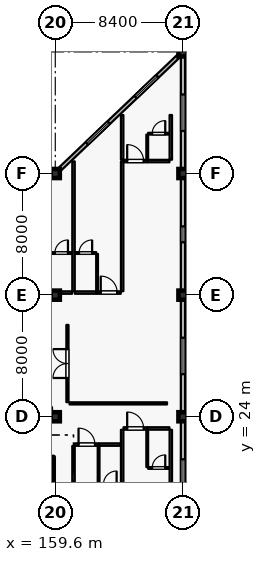
"""IFC4 building model, lengths in metres.
Left out: names, types, materials, properties, quantities, classifications, styles, units other than length and angle.
Written with IfcOpenShell. Run it as: python <this file> out.ifc"""

import sys

from ifc_helpers import new_model, si_unit, direction, frame, frame_2d, origin, origin_2d, place, context, subcontext, project, spatial, rectangle, extrude, element, fill, save


model = new_model("IFC4")
c1 = context("Model", 3, precision=1e-05, world=origin(), true_north=direction((0.0, 1.0)))
c2 = subcontext(c1, "Body", "Model", "MODEL_VIEW")
j1 = project(units=[si_unit("LENGTHUNIT", "METRE"), si_unit("PLANEANGLEUNIT", "RADIAN")], contexts=[c1])
p1 = place(None, origin())
s1 = spatial("IfcSite", under=j1, at=p1, CompositionType="ELEMENT")
p2 = place(p1, origin())
s2 = spatial("IfcBuilding", under=s1, at=p2, CompositionType="ELEMENT")
p3 = place(p2, frame((0.0, 0.0, 39.6)))
s3 = spatial("IfcBuildingStorey", under=s2, at=p3, CompositionType="ELEMENT", Elevation=39.6)
for number, where, z_axis, x_axis in (
    (1, (159.6, 24.0, 0.0), (0.0, 0.0, 1.0), (1.0, 0.0, 0.0)),
    (2, (159.6, 40.0, 0.0), (0.0, 0.0, 1.0), (1.0, 0.0, 0.0)),
    (3, (168.0, 32.0, 0.0), (0.0, 0.0, 1.0), (1.0, 0.0, 0.0)),
    (4, (168.0, 48.0, 0.0), (0.0, 0.0, 1.0), (1.0, 0.0, 0.0)),
    (5, (159.6, 32.0, 0.0), (0.0, 0.0, 1.0), (1.0, 0.0, 0.0)),
    (6, (168.0, 24.0, 0.0), (0.0, 0.0, 1.0), (1.0, 0.0, 0.0)),
    (7, (168.0, 40.0, 0.0), (0.0, 0.0, 1.0), (1.0, 0.0, 0.0)),
):
    element("IfcColumn", number, at=place(p3, frame(where, z_axis=z_axis, x_axis=x_axis)), inside=s3, PredefinedType="COLUMN", context=c2, shape_type="SweptSolid", body=[
        extrude(rectangle(XDim=0.6, YDim=0.6, at=origin_2d()), origin(), (0.0, 0.0, 1.0), 3.6),
    ])
p4 = place(p3, frame((159.9, 40.286, 0.0), z_axis=(0.0, 0.0, 1.0), x_axis=(0.724156257633, 0.689635928973, 0.0)))
e8 = element("IfcWall", 8, at=p4, inside=s3, PredefinedType="SOLIDWALL", context=c2, shape_type="SweptSolid", body=[
    extrude(rectangle(XDim=10.771, YDim=0.24, at=frame_2d((5.386, 0.0))), origin(), (0.0, 0.0, 1.0), 2.94),
])
p5 = place(p4, frame((2.452, 0.0, 0.8)))
e9 = element("IfcOpeningElement", 9, at=p5, cuts=e8, PredefinedType="OPENING", context=c2, shape_type="SweptSolid", body=[
    extrude(rectangle(XDim=2.0, YDim=1.75, at=frame_2d((1.0, 0.875))), frame((0.0, 0.13, 0.0), z_axis=(0.0, -1.0, 0.0), x_axis=(1.0, 0.0, 0.0)), (0.0, 0.0, 1.0), 0.26),
])
p6 = place(p4, frame((6.871, 0.0, 0.8)))
e10 = element("IfcOpeningElement", 10, at=p6, cuts=e8, PredefinedType="OPENING", context=c2, shape_type="SweptSolid", body=[
    extrude(rectangle(XDim=2.0, YDim=1.75, at=frame_2d((1.0, 0.875))), frame((0.0, 0.13, 0.0), z_axis=(0.0, -1.0, 0.0), x_axis=(1.0, 0.0, 0.0)), (0.0, 0.0, 1.0), 0.26),
])
p7 = place(p3, frame((168.0, 47.7, 0.0), z_axis=(0.0, 0.0, 1.0), x_axis=(0.0, -1.0, 0.0)))
e11 = element("IfcWall", 11, at=p7, inside=s3, PredefinedType="SOLIDWALL", context=c2, shape_type="SweptSolid", body=[
    extrude(rectangle(XDim=7.4, YDim=0.28, at=frame_2d((3.7, 0.0))), origin(), (0.0, 0.0, 1.0), 2.7),
])
p8 = place(p7, frame((2.5, 0.0, 0.5)))
e12 = element("IfcOpeningElement", 12, at=p8, cuts=e11, PredefinedType="OPENING", context=c2, shape_type="SweptSolid", body=[
    extrude(rectangle(XDim=2.4, YDim=1.65, at=frame_2d((1.2, 0.825))), frame((0.0, 0.15, 0.0), z_axis=(0.0, -1.0, 0.0), x_axis=(1.0, 0.0, 0.0)), (0.0, 0.0, 1.0), 0.3),
])
p9 = place(p3, frame((168.0, 39.7, 0.0), z_axis=(0.0, 0.0, 1.0), x_axis=(0.0, -1.0, 0.0)))
e13 = element("IfcWall", 13, at=p9, inside=s3, PredefinedType="SOLIDWALL", context=c2, shape_type="SweptSolid", body=[
    extrude(rectangle(XDim=7.4, YDim=0.28, at=frame_2d((3.7, 0.0))), origin(), (0.0, 0.0, 1.0), 2.7),
])
p10 = place(p9, frame((3.175, 0.0, 0.5)))
e14 = element("IfcOpeningElement", 14, at=p10, cuts=e13, PredefinedType="OPENING", context=c2, shape_type="SweptSolid", body=[
    extrude(rectangle(XDim=1.05, YDim=1.65, at=frame_2d((0.525, 0.825))), frame((0.0, 0.15, 0.0), z_axis=(0.0, -1.0, 0.0), x_axis=(1.0, 0.0, 0.0)), (0.0, 0.0, 1.0), 0.3),
])
p11 = place(p3, frame((168.0, 31.7, 0.0), z_axis=(0.0, 0.0, 1.0), x_axis=(0.0, -1.0, 0.0)))
e15 = element("IfcWall", 15, at=p11, inside=s3, PredefinedType="SOLIDWALL", context=c2, shape_type="SweptSolid", body=[
    extrude(rectangle(XDim=7.4, YDim=0.28, at=frame_2d((3.7, 0.0))), origin(), (0.0, 0.0, 1.0), 2.7),
])
p12 = place(p11, frame((2.5, 0.0, 0.5)))
e16 = element("IfcOpeningElement", 16, at=p12, cuts=e15, PredefinedType="OPENING", context=c2, shape_type="SweptSolid", body=[
    extrude(rectangle(XDim=2.4, YDim=1.65, at=frame_2d((1.2, 0.825))), frame((0.0, 0.15, 0.0), z_axis=(0.0, -1.0, 0.0), x_axis=(1.0, 0.0, 0.0)), (0.0, 0.0, 1.0), 0.3),
])
p13 = place(p3, frame((168.0, 23.7, 0.0), z_axis=(0.0, 0.0, 1.0), x_axis=(0.0, -1.0, 0.0)))
e17 = element("IfcWall", 17, at=p13, inside=s3, PredefinedType="SOLIDWALL", context=c2, shape_type="SweptSolid", body=[
    extrude(rectangle(XDim=7.4, YDim=0.28, at=frame_2d((3.7, 0.0))), origin(), (0.0, 0.0, 1.0), 2.7),
])
p14 = place(p13, frame((2.5, 0.0, 0.5)))
e18 = element("IfcOpeningElement", 18, at=p14, cuts=e17, PredefinedType="OPENING", context=c2, shape_type="SweptSolid", body=[
    extrude(rectangle(XDim=2.4, YDim=1.65, at=frame_2d((1.2, 0.825))), frame((0.0, 0.15, 0.0), z_axis=(0.0, -1.0, 0.0), x_axis=(1.0, 0.0, 0.0)), (0.0, 0.0, 1.0), 0.3),
])
p15 = place(p3, frame((159.3, 17.005, 0.0), z_axis=(0.0, 0.0, 1.0), x_axis=(0.0, 1.0, 0.0)))
e19 = element("IfcWall", 19, at=p15, inside=s3, PredefinedType="SHEAR", context=c2, shape_type="SweptSolid", body=[
    extrude(rectangle(XDim=3.95, YDim=0.4, at=frame_2d((1.975, 0.0))), origin(), (0.0, 0.0, 1.0), 3.335),
])
p16 = place(p3, frame((151.3, 21.16, 0.0), z_axis=(0.0, 0.0, 1.0), x_axis=(1.0, 0.0, 0.0)))
e20 = element("IfcWall", 20, at=p16, inside=s3, PredefinedType="SHEAR", context=c2, shape_type="SweptSolid", body=[
    extrude(rectangle(XDim=8.2, YDim=0.4, at=frame_2d((4.1, 0.0))), origin(), (0.0, 0.0, 1.0), 3.335),
])
p17 = place(p16, frame((0.43, 0.0, 0.0)))
e21 = element("IfcOpeningElement", 21, at=p17, cuts=e20, PredefinedType="OPENING", context=c2, shape_type="SweptSolid", body=[
    extrude(rectangle(XDim=1.16, YDim=2.2, at=frame_2d((0.58, 1.1))), frame((0.0, 0.21, 0.0), z_axis=(0.0, -1.0, 0.0), x_axis=(1.0, 0.0, 0.0)), (0.0, 0.0, 1.0), 0.42),
])
p18 = place(p3, frame((159.26, 32.17, 0.0), z_axis=(0.0, 0.0, 1.0), x_axis=(1.0, 0.0, 0.0)))
e22 = element("IfcWall", 22, at=p18, inside=s3, PredefinedType="PARTITIONING", context=c2, shape_type="SweptSolid", body=[
    extrude(rectangle(XDim=1.45, YDim=0.16, at=frame_2d((0.725, 0.0))), origin(), (0.0, 0.0, 1.0), 3.335),
])
p19 = place(p3, frame((159.31, 34.77, 0.0), z_axis=(0.0, 0.0, 1.0), x_axis=(1.0, 0.0, 0.0)))
e23 = element("IfcWall", 23, at=p19, inside=s3, PredefinedType="PARTITIONING", context=c2, shape_type="SweptSolid", body=[
    extrude(rectangle(XDim=1.39, YDim=0.115, at=frame_2d((0.695, 0.0))), origin(), (0.0, 0.0, 1.0), 3.335),
])
p20 = place(p19, frame((0.265, 0.0, 0.0)))
e24 = element("IfcOpeningElement", 24, at=p20, cuts=e23, PredefinedType="OPENING", context=c2, shape_type="SweptSolid", body=[
    extrude(rectangle(XDim=0.86, YDim=2.12, at=frame_2d((0.43, 1.06))), frame((0.0, 0.067, 0.0), z_axis=(0.0, -1.0, 0.0), x_axis=(1.0, 0.0, 0.0)), (0.0, 0.0, 1.0), 0.135),
])
p21 = place(p3, frame((160.89, 32.17, 0.0), z_axis=(0.0, 0.0, 1.0), x_axis=(1.0, 0.0, 0.0)))
e25 = element("IfcWall", 25, at=p21, inside=s3, PredefinedType="PARTITIONING", context=c2, shape_type="SweptSolid", body=[
    extrude(rectangle(XDim=1.45, YDim=0.16, at=frame_2d((0.725, 0.0))), origin(), (0.0, 0.0, 1.0), 3.335),
])
p22 = place(p3, frame((162.35, 32.17, 0.0), z_axis=(0.0, 0.0, 1.0), x_axis=(1.0, 0.0, 0.0)))
e26 = element("IfcWall", 26, at=p22, inside=s3, PredefinedType="PARTITIONING", context=c2, shape_type="SweptSolid", body=[
    extrude(rectangle(XDim=1.56, YDim=0.16, at=frame_2d((0.78, 0.0))), origin(), (0.0, 0.0, 1.0), 3.335),
])
p23 = place(p22, frame((0.24, 0.0, 0.0)))
e27 = element("IfcOpeningElement", 27, at=p23, cuts=e26, PredefinedType="OPENING", context=c2, shape_type="SweptSolid", body=[
    extrude(rectangle(XDim=1.08, YDim=2.3, at=frame_2d((0.54, 1.15))), frame((0.0, 0.09, 0.0), z_axis=(0.0, -1.0, 0.0), x_axis=(1.0, 0.0, 0.0)), (0.0, 0.0, 1.0), 0.18),
])
p24 = place(p3, frame((162.35, 32.26, 0.0), z_axis=(0.0, 0.0, 1.0), x_axis=(0.0, 1.0, 0.0)))
e28 = element("IfcWall", 28, at=p24, inside=s3, PredefinedType="PARTITIONING", context=c2, shape_type="SweptSolid", body=[
    extrude(rectangle(XDim=2.45, YDim=0.115, at=frame_2d((1.225, 0.0))), origin(), (0.0, 0.0, 1.0), 3.335),
])
p25 = place(p3, frame((160.9, 34.77, 0.0), z_axis=(0.0, 0.0, 1.0), x_axis=(1.0, 0.0, 0.0)))
e29 = element("IfcWall", 29, at=p25, inside=s3, PredefinedType="PARTITIONING", context=c2, shape_type="SweptSolid", body=[
    extrude(rectangle(XDim=1.39, YDim=0.115, at=frame_2d((0.695, 0.0))), origin(), (0.0, 0.0, 1.0), 3.335),
])
p26 = place(p25, frame((0.265, 0.0, 0.0)))
e30 = element("IfcOpeningElement", 30, at=p26, cuts=e29, PredefinedType="OPENING", context=c2, shape_type="SweptSolid", body=[
    extrude(rectangle(XDim=0.86, YDim=2.12, at=frame_2d((0.43, 1.06))), frame((0.0, 0.067, 0.0), z_axis=(0.0, -1.0, 0.0), x_axis=(1.0, 0.0, 0.0)), (0.0, 0.0, 1.0), 0.135),
])
for number, where, z_axis, x_axis in (
    (31, (160.8, 32.26, 0.0), (0.0, 0.0, 1.0), (0.0, 1.0, 0.0)),
    (32, (164.0, 32.26, 0.0), (0.0, 0.0, 1.0), (0.0, 1.0, 0.0)),
):
    element("IfcWall", number, at=place(p3, frame(where, z_axis=z_axis, x_axis=x_axis)), inside=s3, PredefinedType="PARTITIONING", context=c2, shape_type="SweptSolid", body=[
        extrude(rectangle(XDim=8.54, YDim=0.16, at=frame_2d((4.27, 0.0))), origin(), (0.0, 0.0, 1.0), 3.335),
    ])
p27 = place(p3, frame((164.09, 40.82, 0.0), z_axis=(0.0, 0.0, 1.0), x_axis=(1.0, 0.0, 0.0)))
e33 = element("IfcWall", 33, at=p27, inside=s3, PredefinedType="PARTITIONING", context=c2, shape_type="SweptSolid", body=[
    extrude(rectangle(XDim=1.56, YDim=0.16, at=frame_2d((0.78, 0.0))), origin(), (0.0, 0.0, 1.0), 3.335),
])
p28 = place(p27, frame((0.24, 0.0, 0.0)))
e34 = element("IfcOpeningElement", 34, at=p28, cuts=e33, PredefinedType="OPENING", context=c2, shape_type="SweptSolid", body=[
    extrude(rectangle(XDim=1.08, YDim=2.3, at=frame_2d((0.54, 1.15))), frame((0.0, 0.09, 0.0), z_axis=(0.0, -1.0, 0.0), x_axis=(1.0, 0.0, 0.0)), (0.0, 0.0, 1.0), 0.18),
])
p29 = place(p3, frame((165.66, 40.82, 0.0), z_axis=(0.0, 0.0, 1.0), x_axis=(1.0, 0.0, 0.0)))
e35 = element("IfcWall", 35, at=p29, inside=s3, PredefinedType="PARTITIONING", context=c2, shape_type="SweptSolid", body=[
    extrude(rectangle(XDim=1.45, YDim=0.16, at=frame_2d((0.725, 0.0))), origin(), (0.0, 0.0, 1.0), 3.335),
])
p30 = place(p3, frame((165.65, 40.91, 0.0), z_axis=(0.0, 0.0, 1.0), x_axis=(0.0, 1.0, 0.0)))
e36 = element("IfcWall", 36, at=p30, inside=s3, PredefinedType="PARTITIONING", context=c2, shape_type="SweptSolid", body=[
    extrude(rectangle(XDim=1.65, YDim=0.115, at=frame_2d((0.825, 0.0))), origin(), (0.0, 0.0, 1.0), 3.335),
])
p31 = place(p3, frame((165.71, 42.62, 0.0), z_axis=(0.0, 0.0, 1.0), x_axis=(1.0, 0.0, 0.0)))
e37 = element("IfcWall", 37, at=p31, inside=s3, PredefinedType="PARTITIONING", context=c2, shape_type="SweptSolid", body=[
    extrude(rectangle(XDim=1.39, YDim=0.115, at=frame_2d((0.695, 0.0))), origin(), (0.0, 0.0, 1.0), 3.335),
])
p32 = place(p31, frame((0.265, 0.0, 0.0)))
e38 = element("IfcOpeningElement", 38, at=p32, cuts=e37, PredefinedType="OPENING", context=c2, shape_type="SweptSolid", body=[
    extrude(rectangle(XDim=0.86, YDim=2.12, at=frame_2d((0.43, 1.06))), frame((0.0, 0.067, 0.0), z_axis=(0.0, -1.0, 0.0), x_axis=(1.0, 0.0, 0.0)), (0.0, 0.0, 1.0), 0.135),
])
for number, where, z_axis, x_axis in (
    (39, (164.0, 40.91, 0.0), (0.0, 0.0, 1.0), (0.0, 1.0, 0.0)),
    (40, (167.2, 40.91, 0.0), (0.0, 0.0, 1.0), (0.0, 1.0, 0.0)),
):
    element("IfcWall", number, at=place(p3, frame(where, z_axis=z_axis, x_axis=x_axis)), inside=s3, PredefinedType="PARTITIONING", context=c2, shape_type="SweptSolid", body=[
        extrude(rectangle(XDim=2.94, YDim=0.16, at=frame_2d((1.47, 0.0))), origin(), (0.0, 0.0, 1.0), 3.335),
    ])
p33 = place(p3, frame((160.89, 22.17, 0.0), z_axis=(0.0, 0.0, 1.0), x_axis=(1.0, 0.0, 0.0)))
e41 = element("IfcWall", 41, at=p33, inside=s3, PredefinedType="PARTITIONING", context=c2, shape_type="SweptSolid", body=[
    extrude(rectangle(XDim=1.56, YDim=0.16, at=frame_2d((0.78, 0.0))), origin(), (0.0, 0.0, 1.0), 3.335),
])
p34 = place(p33, frame((0.24, 0.0, 0.0)))
e42 = element("IfcOpeningElement", 42, at=p34, cuts=e41, PredefinedType="OPENING", context=c2, shape_type="SweptSolid", body=[
    extrude(rectangle(XDim=1.08, YDim=2.3, at=frame_2d((0.54, 1.15))), frame((0.0, 0.09, 0.0), z_axis=(0.0, -1.0, 0.0), x_axis=(1.0, 0.0, 0.0)), (0.0, 0.0, 1.0), 0.18),
])
p35 = place(p3, frame((162.46, 22.17, 0.0), z_axis=(0.0, 0.0, 1.0), x_axis=(1.0, 0.0, 0.0)))
e43 = element("IfcWall", 43, at=p35, inside=s3, PredefinedType="PARTITIONING", context=c2, shape_type="SweptSolid", body=[
    extrude(rectangle(XDim=1.45, YDim=0.16, at=frame_2d((0.725, 0.0))), origin(), (0.0, 0.0, 1.0), 3.335),
])
p36 = place(p3, frame((162.45, 19.63, 0.0), z_axis=(0.0, 0.0, 1.0), x_axis=(0.0, 1.0, 0.0)))
e44 = element("IfcWall", 44, at=p36, inside=s3, PredefinedType="PARTITIONING", context=c2, shape_type="SweptSolid", body=[
    extrude(rectangle(XDim=2.45, YDim=0.115, at=frame_2d((1.225, 0.0))), origin(), (0.0, 0.0, 1.0), 3.335),
])
p37 = place(p3, frame((160.8, 12.53, 0.0), z_axis=(0.0, 0.0, 1.0), x_axis=(0.0, 1.0, 0.0)))
e45 = element("IfcWall", 45, at=p37, inside=s3, PredefinedType="PARTITIONING", context=c2, shape_type="SweptSolid", body=[
    extrude(rectangle(XDim=9.55, YDim=0.16, at=frame_2d((4.775, 0.0))), origin(), (0.0, 0.0, 1.0), 3.335),
])
p38 = place(p3, frame((164.09, 23.23, 0.0), z_axis=(0.0, 0.0, 1.0), x_axis=(1.0, 0.0, 0.0)))
e46 = element("IfcWall", 46, at=p38, inside=s3, PredefinedType="PARTITIONING", context=c2, shape_type="SweptSolid", body=[
    extrude(rectangle(XDim=1.56, YDim=0.16, at=frame_2d((0.78, 0.0))), origin(), (0.0, 0.0, 1.0), 3.335),
])
p39 = place(p38, frame((0.24, 0.0, 0.0)))
e47 = element("IfcOpeningElement", 47, at=p39, cuts=e46, PredefinedType="OPENING", context=c2, shape_type="SweptSolid", body=[
    extrude(rectangle(XDim=1.08, YDim=2.3, at=frame_2d((0.54, 1.15))), frame((0.0, 0.09, 0.0), z_axis=(0.0, -1.0, 0.0), x_axis=(1.0, 0.0, 0.0)), (0.0, 0.0, 1.0), 0.18),
])
p40 = place(p3, frame((165.66, 23.23, 0.0), z_axis=(0.0, 0.0, 1.0), x_axis=(1.0, 0.0, 0.0)))
e48 = element("IfcWall", 48, at=p40, inside=s3, PredefinedType="PARTITIONING", context=c2, shape_type="SweptSolid", body=[
    extrude(rectangle(XDim=1.45, YDim=0.16, at=frame_2d((0.725, 0.0))), origin(), (0.0, 0.0, 1.0), 3.335),
])
p41 = place(p3, frame((165.65, 20.69, 0.0), z_axis=(0.0, 0.0, 1.0), x_axis=(0.0, 1.0, 0.0)))
e49 = element("IfcWall", 49, at=p41, inside=s3, PredefinedType="PARTITIONING", context=c2, shape_type="SweptSolid", body=[
    extrude(rectangle(XDim=2.45, YDim=0.115, at=frame_2d((1.225, 0.0))), origin(), (0.0, 0.0, 1.0), 3.335),
])
p42 = place(p3, frame((165.71, 20.63, 0.0), z_axis=(0.0, 0.0, 1.0), x_axis=(1.0, 0.0, 0.0)))
e50 = element("IfcWall", 50, at=p42, inside=s3, PredefinedType="PARTITIONING", context=c2, shape_type="SweptSolid", body=[
    extrude(rectangle(XDim=1.39, YDim=0.115, at=frame_2d((0.695, 0.0))), origin(), (0.0, 0.0, 1.0), 3.335),
])
p43 = place(p42, frame((0.265, 0.0, 0.0)))
e51 = element("IfcOpeningElement", 51, at=p43, cuts=e50, PredefinedType="OPENING", context=c2, shape_type="SweptSolid", body=[
    extrude(rectangle(XDim=0.86, YDim=2.12, at=frame_2d((0.43, 1.06))), frame((0.0, 0.067, 0.0), z_axis=(0.0, -1.0, 0.0), x_axis=(1.0, 0.0, 0.0)), (0.0, 0.0, 1.0), 0.135),
])
for number, where, z_axis, x_axis in (
    (52, (164.0, 15.58, 0.0), (0.0, 0.0, 1.0), (0.0, 1.0, 0.0)),
    (53, (167.2, 15.58, 0.0), (0.0, 0.0, 1.0), (0.0, 1.0, 0.0)),
):
    element("IfcWall", number, at=place(p3, frame(where, z_axis=z_axis, x_axis=x_axis)), inside=s3, PredefinedType="PARTITIONING", context=c2, shape_type="SweptSolid", body=[
        extrude(rectangle(XDim=7.56, YDim=0.16, at=frame_2d((3.78, 0.0))), origin(), (0.0, 0.0, 1.0), 3.335),
    ])
p44 = place(p3, frame((160.4, 24.96, 0.0), z_axis=(0.0, 0.0, 1.0), x_axis=(0.0, 1.0, 0.0)))
e54 = element("IfcWall", 54, at=p44, inside=s3, PredefinedType="PARTITIONING", context=c2, shape_type="SweptSolid", body=[
    extrude(rectangle(XDim=5.08, YDim=0.14, at=frame_2d((2.54, 0.0))), origin(), (0.0, 0.0, 1.0), 3.335),
])
p45 = place(p44, frame((1.59, 0.0, 0.0)))
e55 = element("IfcOpeningElement", 55, at=p45, cuts=e54, PredefinedType="OPENING", context=c2, shape_type="SweptSolid", body=[
    extrude(rectangle(XDim=1.9, YDim=2.4, at=frame_2d((0.95, 1.2))), frame((0.0, 0.08, 0.0), z_axis=(0.0, -1.0, 0.0), x_axis=(1.0, 0.0, 0.0)), (0.0, 0.0, 1.0), 0.16),
])
p46 = place(p3, frame((160.54, 24.88, 0.0), z_axis=(0.0, 0.0, 1.0), x_axis=(1.0, 0.0, 0.0)))
e56 = element("IfcWall", 56, at=p46, inside=s3, PredefinedType="PARTITIONING", context=c2, shape_type="SweptSolid", body=[
    extrude(rectangle(XDim=6.41, YDim=0.14, at=frame_2d((3.205, 0.0))), origin(), (0.0, 0.0, 1.0), 3.335),
])
p47 = place(p5, origin())
e57 = element("IfcWindow", 57, at=p47, inside=s3, PartitioningType="DOUBLE_PANEL_VERTICAL", PredefinedType="WINDOW", context=c2, shape_type="SweptSolid", body=[
    extrude(rectangle(XDim=2.0, YDim=1.75, at=frame_2d((1.0, 0.875))), frame((0.0, 0.03, 0.0), z_axis=(0.0, -1.0, 0.0), x_axis=(1.0, 0.0, 0.0)), (0.0, 0.0, 1.0), 0.06),
])
fill(e9, e57)
p48 = place(p6, origin())
e58 = element("IfcWindow", 58, at=p48, inside=s3, PartitioningType="DOUBLE_PANEL_VERTICAL", PredefinedType="WINDOW", context=c2, shape_type="SweptSolid", body=[
    extrude(rectangle(XDim=2.0, YDim=1.75, at=frame_2d((1.0, 0.875))), frame((0.0, 0.03, 0.0), z_axis=(0.0, -1.0, 0.0), x_axis=(1.0, 0.0, 0.0)), (0.0, 0.0, 1.0), 0.06),
])
fill(e10, e58)
p49 = place(p8, origin())
e59 = element("IfcWindow", 59, at=p49, inside=s3, PartitioningType="DOUBLE_PANEL_VERTICAL", PredefinedType="WINDOW", context=c2, shape_type="SweptSolid", body=[
    extrude(rectangle(XDim=2.4, YDim=1.65, at=frame_2d((1.2, 0.825))), frame((0.0, 0.03, 0.0), z_axis=(0.0, -1.0, 0.0), x_axis=(1.0, 0.0, 0.0)), (0.0, 0.0, 1.0), 0.06),
])
fill(e12, e59)
p50 = place(p10, origin())
e60 = element("IfcWindow", 60, at=p50, inside=s3, PartitioningType="SINGLE_PANEL", PredefinedType="WINDOW", context=c2, shape_type="SweptSolid", body=[
    extrude(rectangle(XDim=1.05, YDim=1.65, at=frame_2d((0.525, 0.825))), frame((0.0, 0.03, 0.0), z_axis=(0.0, -1.0, 0.0), x_axis=(1.0, 0.0, 0.0)), (0.0, 0.0, 1.0), 0.06),
])
fill(e14, e60)
p51 = place(p12, origin())
e61 = element("IfcWindow", 61, at=p51, inside=s3, PartitioningType="DOUBLE_PANEL_VERTICAL", PredefinedType="WINDOW", context=c2, shape_type="SweptSolid", body=[
    extrude(rectangle(XDim=2.4, YDim=1.65, at=frame_2d((1.2, 0.825))), frame((0.0, 0.03, 0.0), z_axis=(0.0, -1.0, 0.0), x_axis=(1.0, 0.0, 0.0)), (0.0, 0.0, 1.0), 0.06),
])
fill(e16, e61)
p52 = place(p14, origin())
e62 = element("IfcWindow", 62, at=p52, inside=s3, PartitioningType="DOUBLE_PANEL_VERTICAL", PredefinedType="WINDOW", context=c2, shape_type="SweptSolid", body=[
    extrude(rectangle(XDim=2.4, YDim=1.65, at=frame_2d((1.2, 0.825))), frame((0.0, 0.03, 0.0), z_axis=(0.0, -1.0, 0.0), x_axis=(1.0, 0.0, 0.0)), (0.0, 0.0, 1.0), 0.06),
])
fill(e18, e62)
p53 = place(p20, origin())
e63 = element("IfcDoor", 63, at=p53, inside=s3, OperationType="SINGLE_SWING_RIGHT", PredefinedType="DOOR", context=c2, shape_type="SweptSolid", body=[
    extrude(rectangle(XDim=0.86, YDim=2.12, at=frame_2d((0.43, 1.06))), frame((0.0, 0.025, 0.0), z_axis=(0.0, -1.0, 0.0), x_axis=(1.0, 0.0, 0.0)), (0.0, 0.0, 1.0), 0.05),
])
fill(e24, e63)
p54 = place(p23, origin())
e64 = element("IfcDoor", 64, at=p54, inside=s3, OperationType="SINGLE_SWING_LEFT", PredefinedType="DOOR", context=c2, shape_type="SweptSolid", body=[
    extrude(rectangle(XDim=1.08, YDim=2.3, at=frame_2d((0.54, 1.15))), frame((0.0, 0.025, 0.0), z_axis=(0.0, -1.0, 0.0), x_axis=(1.0, 0.0, 0.0)), (0.0, 0.0, 1.0), 0.05),
])
fill(e27, e64)
p55 = place(p26, origin())
e65 = element("IfcDoor", 65, at=p55, inside=s3, OperationType="SINGLE_SWING_RIGHT", PredefinedType="DOOR", context=c2, shape_type="SweptSolid", body=[
    extrude(rectangle(XDim=0.86, YDim=2.12, at=frame_2d((0.43, 1.06))), frame((0.0, 0.025, 0.0), z_axis=(0.0, -1.0, 0.0), x_axis=(1.0, 0.0, 0.0)), (0.0, 0.0, 1.0), 0.05),
])
fill(e30, e65)
p56 = place(p28, origin())
e66 = element("IfcDoor", 66, at=p56, inside=s3, OperationType="SINGLE_SWING_LEFT", PredefinedType="DOOR", context=c2, shape_type="SweptSolid", body=[
    extrude(rectangle(XDim=1.08, YDim=2.3, at=frame_2d((0.54, 1.15))), frame((0.0, 0.025, 0.0), z_axis=(0.0, -1.0, 0.0), x_axis=(1.0, 0.0, 0.0)), (0.0, 0.0, 1.0), 0.05),
])
fill(e34, e66)
p57 = place(p32, origin())
e67 = element("IfcDoor", 67, at=p57, inside=s3, OperationType="SINGLE_SWING_RIGHT", PredefinedType="DOOR", context=c2, shape_type="SweptSolid", body=[
    extrude(rectangle(XDim=0.86, YDim=2.12, at=frame_2d((0.43, 1.06))), frame((0.0, 0.025, 0.0), z_axis=(0.0, -1.0, 0.0), x_axis=(1.0, 0.0, 0.0)), (0.0, 0.0, 1.0), 0.05),
])
fill(e38, e67)
p58 = place(p34, origin())
e68 = element("IfcDoor", 68, at=p58, inside=s3, OperationType="SINGLE_SWING_LEFT", PredefinedType="DOOR", context=c2, shape_type="SweptSolid", body=[
    extrude(rectangle(XDim=1.08, YDim=2.3, at=frame_2d((0.54, 1.15))), frame((0.0, 0.025, 0.0), z_axis=(0.0, -1.0, 0.0), x_axis=(1.0, 0.0, 0.0)), (0.0, 0.0, 1.0), 0.05),
])
fill(e42, e68)
p59 = place(p39, origin())
e69 = element("IfcDoor", 69, at=p59, inside=s3, OperationType="SINGLE_SWING_LEFT", PredefinedType="DOOR", context=c2, shape_type="SweptSolid", body=[
    extrude(rectangle(XDim=1.08, YDim=2.3, at=frame_2d((0.54, 1.15))), frame((0.0, 0.025, 0.0), z_axis=(0.0, -1.0, 0.0), x_axis=(1.0, 0.0, 0.0)), (0.0, 0.0, 1.0), 0.05),
])
fill(e47, e69)
p60 = place(p43, origin())
e70 = element("IfcDoor", 70, at=p60, inside=s3, OperationType="SINGLE_SWING_RIGHT", PredefinedType="DOOR", context=c2, shape_type="SweptSolid", body=[
    extrude(rectangle(XDim=0.86, YDim=2.12, at=frame_2d((0.43, 1.06))), frame((0.0, 0.025, 0.0), z_axis=(0.0, -1.0, 0.0), x_axis=(1.0, 0.0, 0.0)), (0.0, 0.0, 1.0), 0.05),
])
fill(e51, e70)
p61 = place(p45, origin())
e71 = element("IfcDoor", 71, at=p61, inside=s3, OperationType="DOUBLE_DOOR_SINGLE_SWING", PredefinedType="DOOR", context=c2, shape_type="SweptSolid", body=[
    extrude(rectangle(XDim=1.9, YDim=2.4, at=frame_2d((0.95, 1.2))), frame((0.0, 0.025, 0.0), z_axis=(0.0, -1.0, 0.0), x_axis=(1.0, 0.0, 0.0)), (0.0, 0.0, 1.0), 0.05),
])
fill(e55, e71)
save(model, sys.argv[1])
